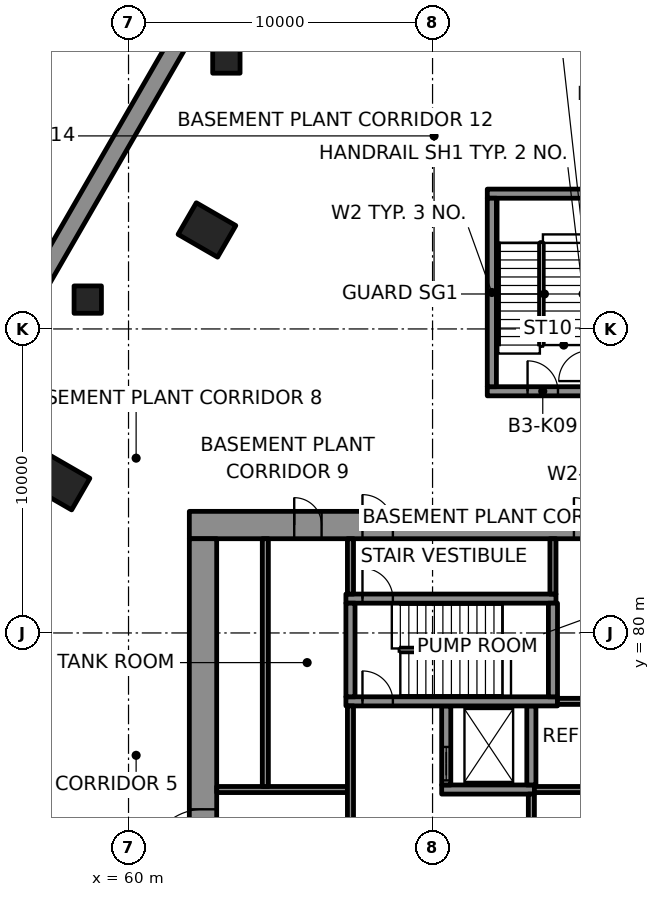
"""IFC4 building model, lengths in metres.
Left out: names, types, materials, properties, quantities, classifications, styles, units other than length and angle.
Written with IfcOpenShell. Run it as: python <this file> out.ifc"""

import sys

from ifc_helpers import new_model, si_unit, direction, frame, frame_2d, origin, origin_2d, place, context, subcontext, project, spatial, polyline, rectangle, outline, extrude, element, fill, save


model = new_model("IFC4")
c1 = context("Model", 3, precision=1e-05, world=origin(), true_north=direction((0.0, 1.0)))
c2 = subcontext(c1, "Body", "Model", "MODEL_VIEW")
j1 = project(units=[si_unit("LENGTHUNIT", "METRE"), si_unit("PLANEANGLEUNIT", "RADIAN")], contexts=[c1])
p1 = place(None, origin())
s1 = spatial("IfcSite", under=j1, at=p1, CompositionType="ELEMENT")
p2 = place(p1, origin())
s2 = spatial("IfcBuilding", under=s1, at=p2, CompositionType="ELEMENT")
p3 = place(p2, frame((0.0, 0.0, -14.0)))
s3 = spatial("IfcBuildingStorey", under=s2, at=p3, CompositionType="ELEMENT", Elevation=-14.0)
p4 = place(p3, frame((67.936, 110.334, -0.35), z_axis=(0.0, 0.0, 1.0), x_axis=(-0.499999089162, -0.866025929656, 0.0)))
e1 = element("IfcWall", 1, at=p4, inside=s3, PredefinedType="SOLIDWALL", context=c2, shape_type="SweptSolid", body=[
    extrude(rectangle(XDim=53.501, YDim=0.6, at=frame_2d((26.751, 0.0))), origin(), (0.0, 0.0, 1.0), 4.5),
])
p5 = place(p3, frame((0.0, 0.0, -14.5)))
e2 = element("IfcWall", 2, at=p5, inside=s3, PredefinedType="SOLIDWALL", context=c2, shape_type="SweptSolid", body=[
    extrude(outline(polyline([(67.936, 110.334), (41.185, 64.0), (40.723, 64.8), (67.474, 111.134), (67.936, 110.334)])), origin(), (0.0, 0.0, 1.0), 14.15),
])
for number, where, z_axis, x_axis in (
    (3, (62.579, 93.256, -0.35), (0.0, 0.0, 1.0), (-0.5, -0.866, 0.0)),
    (4, (57.78, 84.942, -0.35), (0.0, 0.0, 1.0), (-0.5, -0.866, 0.0)),
):
    element("IfcColumn", number, at=place(p3, frame(where, z_axis=z_axis, x_axis=x_axis)), inside=s3, PredefinedType="COLUMN", context=c2, shape_type="SweptSolid", body=[
        extrude(rectangle(XDim=1.2, YDim=1.5, at=origin_2d()), origin(), (0.0, 0.0, 1.0), 4.85),
    ])
for number, where, z_axis, x_axis in (
    (5, (58.659, 90.966, -0.35), (0.0, 0.0, 1.0), (1.0, 0.0, 0.0)),
    (6, (63.219, 98.863, -0.35), (0.0, 0.0, 1.0), (1.0, 0.0, 0.0)),
):
    element("IfcColumn", number, at=place(p3, frame(where, z_axis=z_axis, x_axis=x_axis)), inside=s3, PredefinedType="COLUMN", context=c2, shape_type="SweptSolid", body=[
        extrude(rectangle(XDim=0.9, YDim=0.9, at=origin_2d()), origin(), (0.0, 0.0, 1.0), 4.85),
    ])
p6 = place(p3, frame((62.0, 83.55, -0.35), z_axis=(0.0, 0.0, 1.0), x_axis=(1.0, 0.0, 0.0)))
e7 = element("IfcWall", 7, at=p6, inside=s3, PredefinedType="SHEAR", context=c2, shape_type="SweptSolid", body=[
    extrude(rectangle(XDim=26.0, YDim=0.9, at=frame_2d((13.0, 0.0))), origin(), (0.0, 0.0, 1.0), 4.5),
])
p7 = place(p6, frame((5.695, 0.0, 0.35)))
e8 = element("IfcOpeningElement", 8, at=p7, cuts=e7, PredefinedType="OPENING", context=c2, shape_type="SweptSolid", body=[
    extrude(rectangle(XDim=1.0, YDim=2.1, at=frame_2d((0.5, 1.05))), frame((0.0, 0.46, 0.0), z_axis=(0.0, -1.0, 0.0), x_axis=(1.0, 0.0, 0.0)), (0.0, 0.0, 1.0), 0.92),
])
p8 = place(p6, frame((19.505, 0.0, 0.35)))
e9 = element("IfcOpeningElement", 9, at=p8, cuts=e7, PredefinedType="OPENING", context=c2, shape_type="SweptSolid", body=[
    extrude(rectangle(XDim=1.0, YDim=2.1, at=frame_2d((0.5, 1.05))), frame((0.0, 0.46, 0.0), z_axis=(0.0, -1.0, 0.0), x_axis=(1.0, 0.0, 0.0)), (0.0, 0.0, 1.0), 0.92),
])
p9 = place(p6, frame((3.45, 0.0, 0.35)))
e10 = element("IfcOpeningElement", 10, at=p9, cuts=e7, PredefinedType="OPENING", context=c2, shape_type="SweptSolid", body=[
    extrude(rectangle(XDim=0.9, YDim=2.1, at=frame_2d((0.45, 1.05))), frame((0.0, 0.46, 0.0), z_axis=(0.0, -1.0, 0.0), x_axis=(1.0, 0.0, 0.0)), (0.0, 0.0, 1.0), 0.92),
])
p10 = place(p6, frame((12.65, 0.0, 0.35)))
e11 = element("IfcOpeningElement", 11, at=p10, cuts=e7, PredefinedType="OPENING", context=c2, shape_type="SweptSolid", body=[
    extrude(rectangle(XDim=0.9, YDim=2.1, at=frame_2d((0.45, 1.05))), frame((0.0, 0.46, 0.0), z_axis=(0.0, -1.0, 0.0), x_axis=(1.0, 0.0, 0.0)), (0.0, 0.0, 1.0), 0.92),
])
p11 = place(p6, frame((22.55, 0.0, 0.35)))
e12 = element("IfcOpeningElement", 12, at=p11, cuts=e7, PredefinedType="OPENING", context=c2, shape_type="SweptSolid", body=[
    extrude(rectangle(XDim=0.9, YDim=2.1, at=frame_2d((0.45, 1.05))), frame((0.0, 0.46, 0.0), z_axis=(0.0, -1.0, 0.0), x_axis=(1.0, 0.0, 0.0)), (0.0, 0.0, 1.0), 0.92),
])
p12 = place(p3, frame((62.45, 66.9, -0.35), z_axis=(0.0, 0.0, 1.0), x_axis=(0.0, 1.0, 0.0)))
e13 = element("IfcWall", 13, at=p12, inside=s3, PredefinedType="SHEAR", context=c2, shape_type="SweptSolid", body=[
    extrude(rectangle(XDim=16.2, YDim=0.9, at=frame_2d((8.1, 0.0))), origin(), (0.0, 0.0, 1.0), 4.5),
])
p13 = place(p12, frame((5.5, 0.0, 0.35)))
e14 = element("IfcOpeningElement", 14, at=p13, cuts=e13, PredefinedType="OPENING", context=c2, shape_type="SweptSolid", body=[
    extrude(rectangle(XDim=1.8, YDim=2.1, at=frame_2d((0.9, 1.05))), frame((0.0, 0.46, 0.0), z_axis=(0.0, -1.0, 0.0), x_axis=(1.0, 0.0, 0.0)), (0.0, 0.0, 1.0), 0.92),
])
p14 = place(p3, frame((70.3, 74.85, -0.35), z_axis=(0.0, 0.0, 1.0), x_axis=(1.0, 0.0, 0.0)))
e15 = element("IfcWall", 15, at=p14, inside=s3, PredefinedType="SHEAR", context=c2, shape_type="SweptSolid", body=[
    extrude(rectangle(XDim=3.05, YDim=0.3, at=frame_2d((1.525, 0.0))), origin(), (0.0, 0.0, 1.0), 4.5),
])
p15 = place(p3, frame((70.45, 75.0, -0.35), z_axis=(0.0, 0.0, 1.0), x_axis=(0.0, 1.0, 0.0)))
e16 = element("IfcWall", 16, at=p15, inside=s3, PredefinedType="SHEAR", context=c2, shape_type="SweptSolid", body=[
    extrude(rectangle(XDim=2.6, YDim=0.3, at=frame_2d((1.3, 0.0))), origin(), (0.0, 0.0, 1.0), 4.5),
])
p16 = place(p15, frame((0.15, 0.0, 0.35)))
e17 = element("IfcOpeningElement", 17, at=p16, cuts=e16, PredefinedType="OPENING", context=c2, shape_type="SweptSolid", body=[
    extrude(rectangle(XDim=1.1, YDim=2.1, at=frame_2d((0.55, 1.05))), frame((0.0, 0.16, 0.0), z_axis=(0.0, -1.0, 0.0), x_axis=(1.0, 0.0, 0.0)), (0.0, 0.0, 1.0), 0.32),
])
p17 = place(p3, frame((73.25, 75.0, -0.35), z_axis=(0.0, 0.0, 1.0), x_axis=(0.0, 1.0, 0.0)))
e18 = element("IfcWall", 18, at=p17, inside=s3, PredefinedType="SHEAR", context=c2, shape_type="SweptSolid", body=[
    extrude(rectangle(XDim=2.6, YDim=0.3, at=frame_2d((1.3, 0.0))), origin(), (0.0, 0.0, 1.0), 4.5),
])
p18 = place(p3, frame((67.15, 77.75, -0.35), z_axis=(0.0, 0.0, 1.0), x_axis=(1.0, 0.0, 0.0)))
e19 = element("IfcWall", 19, at=p18, inside=s3, PredefinedType="SHEAR", context=c2, shape_type="SweptSolid", body=[
    extrude(rectangle(XDim=6.96, YDim=0.3, at=frame_2d((3.48, 0.0))), origin(), (0.0, 0.0, 1.0), 4.5),
])
p19 = place(p18, frame((0.545, 0.0, 0.35)))
e20 = element("IfcOpeningElement", 20, at=p19, cuts=e19, PredefinedType="OPENING", context=c2, shape_type="SweptSolid", body=[
    extrude(rectangle(XDim=1.0, YDim=2.1, at=frame_2d((0.5, 1.05))), frame((0.0, 0.16, 0.0), z_axis=(0.0, -1.0, 0.0), x_axis=(1.0, 0.0, 0.0)), (0.0, 0.0, 1.0), 0.32),
])
p20 = place(p3, frame((67.15, 81.13, -0.35), z_axis=(0.0, 0.0, 1.0), x_axis=(1.0, 0.0, 0.0)))
e21 = element("IfcWall", 21, at=p20, inside=s3, PredefinedType="SHEAR", context=c2, shape_type="SweptSolid", body=[
    extrude(rectangle(XDim=6.91, YDim=0.3, at=frame_2d((3.455, 0.0))), origin(), (0.0, 0.0, 1.0), 4.5),
])
p21 = place(p20, frame((0.545, 0.0, 0.35)))
e22 = element("IfcOpeningElement", 22, at=p21, cuts=e21, PredefinedType="OPENING", context=c2, shape_type="SweptSolid", body=[
    extrude(rectangle(XDim=1.0, YDim=2.1, at=frame_2d((0.5, 1.05))), frame((0.0, 0.16, 0.0), z_axis=(0.0, -1.0, 0.0), x_axis=(1.0, 0.0, 0.0)), (0.0, 0.0, 1.0), 0.32),
])
for number, where, z_axis, x_axis in (
    (23, (67.3, 77.9, -0.35), (0.0, 0.0, 1.0), (0.0, 1.0, 0.0)),
    (24, (73.96, 77.9, -0.35), (0.0, 0.0, 1.0), (0.0, 1.0, 0.0)),
):
    element("IfcWall", number, at=place(p3, frame(where, z_axis=z_axis, x_axis=x_axis)), inside=s3, PredefinedType="SHEAR", context=c2, shape_type="SweptSolid", body=[
        extrude(rectangle(XDim=3.08, YDim=0.3, at=frame_2d((1.54, 0.0))), origin(), (0.0, 0.0, 1.0), 4.5),
    ])
p22 = place(p3, frame((71.8, 87.95, -0.35), z_axis=(0.0, 0.0, 1.0), x_axis=(1.0, 0.0, 0.0)))
e25 = element("IfcWall", 25, at=p22, inside=s3, PredefinedType="SHEAR", context=c2, shape_type="SweptSolid", body=[
    extrude(rectangle(XDim=6.4, YDim=0.3, at=frame_2d((3.2, 0.0))), origin(), (0.0, 0.0, 1.0), 4.5),
])
p23 = place(p22, frame((1.325, 0.0, 0.35)))
e26 = element("IfcOpeningElement", 26, at=p23, cuts=e25, PredefinedType="OPENING", context=c2, shape_type="SweptSolid", body=[
    extrude(rectangle(XDim=1.0, YDim=2.1, at=frame_2d((0.5, 1.05))), frame((0.0, 0.16, 0.0), z_axis=(0.0, -1.0, 0.0), x_axis=(1.0, 0.0, 0.0)), (0.0, 0.0, 1.0), 0.32),
])
p24 = place(p22, frame((4.125, 0.0, 0.35)))
e27 = element("IfcOpeningElement", 27, at=p24, cuts=e25, PredefinedType="OPENING", context=c2, shape_type="SweptSolid", body=[
    extrude(rectangle(XDim=1.2, YDim=2.1, at=frame_2d((0.6, 1.05))), frame((0.0, 0.16, 0.0), z_axis=(0.0, -1.0, 0.0), x_axis=(1.0, 0.0, 0.0)), (0.0, 0.0, 1.0), 0.32),
])
p25 = place(p3, frame((71.8, 94.45, -0.35), z_axis=(0.0, 0.0, 1.0), x_axis=(1.0, 0.0, 0.0)))
e28 = element("IfcWall", 28, at=p25, inside=s3, PredefinedType="SHEAR", context=c2, shape_type="SweptSolid", body=[
    extrude(rectangle(XDim=6.4, YDim=0.3, at=frame_2d((3.2, 0.0))), origin(), (0.0, 0.0, 1.0), 4.5),
])
p26 = place(p3, frame((71.95, 88.1, -0.35), z_axis=(0.0, 0.0, 1.0), x_axis=(0.0, 1.0, 0.0)))
e29 = element("IfcWall", 29, at=p26, inside=s3, PredefinedType="SHEAR", context=c2, shape_type="SweptSolid", body=[
    extrude(rectangle(XDim=6.2, YDim=0.3, at=frame_2d((3.1, 0.0))), origin(), (0.0, 0.0, 1.0), 4.5),
])
p27 = place(p3, frame((62.9, 74.85, 0.0), z_axis=(0.0, 0.0, 1.0), x_axis=(1.0, 0.0, 0.0)))
e30 = element("IfcWall", 30, at=p27, inside=s3, PredefinedType="PARTITIONING", context=c2, shape_type="SweptSolid", body=[
    extrude(rectangle(XDim=4.3, YDim=0.2, at=frame_2d((2.15, 0.0))), origin(), (0.0, 0.0, 1.0), 4.15),
])
p28 = place(p3, frame((73.35, 74.85, 0.0), z_axis=(0.0, 0.0, 1.0), x_axis=(1.0, 0.0, 0.0)))
e31 = element("IfcWall", 31, at=p28, inside=s3, PredefinedType="PARTITIONING", context=c2, shape_type="SweptSolid", body=[
    extrude(rectangle(XDim=13.75, YDim=0.2, at=frame_2d((6.875, 0.0))), origin(), (0.0, 0.0, 1.0), 4.15),
])
p29 = place(p28, frame((2.25, 0.0, 0.0)))
e32 = element("IfcOpeningElement", 32, at=p29, cuts=e31, PredefinedType="OPENING", context=c2, shape_type="SweptSolid", body=[
    extrude(rectangle(XDim=0.9, YDim=2.1, at=frame_2d((0.45, 1.05))), frame((0.0, 0.11, 0.0), z_axis=(0.0, -1.0, 0.0), x_axis=(1.0, 0.0, 0.0)), (0.0, 0.0, 1.0), 0.22),
])
p30 = place(p28, frame((7.85, 0.0, 0.0)))
e33 = element("IfcOpeningElement", 33, at=p30, cuts=e31, PredefinedType="OPENING", context=c2, shape_type="SweptSolid", body=[
    extrude(rectangle(XDim=0.9, YDim=2.1, at=frame_2d((0.45, 1.05))), frame((0.0, 0.11, 0.0), z_axis=(0.0, -1.0, 0.0), x_axis=(1.0, 0.0, 0.0)), (0.0, 0.0, 1.0), 0.22),
])
p31 = place(p3, frame((74.11, 77.75, 0.0), z_axis=(0.0, 0.0, 1.0), x_axis=(1.0, 0.0, 0.0)))
e34 = element("IfcWall", 34, at=p31, inside=s3, PredefinedType="PARTITIONING", context=c2, shape_type="SweptSolid", body=[
    extrude(rectangle(XDim=1.98, YDim=0.2, at=frame_2d((0.99, 0.0))), origin(), (0.0, 0.0, 1.0), 4.15),
])
p32 = place(p3, frame((64.5, 74.95, 0.0), z_axis=(0.0, 0.0, 1.0), x_axis=(0.0, 1.0, 0.0)))
e35 = element("IfcWall", 35, at=p32, inside=s3, PredefinedType="PARTITIONING", context=c2, shape_type="SweptSolid", body=[
    extrude(rectangle(XDim=8.15, YDim=0.2, at=frame_2d((4.075, 0.0))), origin(), (0.0, 0.0, 1.0), 4.15),
])
p33 = place(p3, frame((67.3, 71.85, 0.0), z_axis=(0.0, 0.0, 1.0), x_axis=(0.0, 1.0, 0.0)))
e36 = element("IfcWall", 36, at=p33, inside=s3, PredefinedType="PARTITIONING", context=c2, shape_type="SweptSolid", body=[
    extrude(rectangle(XDim=5.75, YDim=0.2, at=frame_2d((2.875, 0.0))), origin(), (0.0, 0.0, 1.0), 4.15),
])
p34 = place(p33, frame((0.85, 0.0, 0.0)))
e37 = element("IfcOpeningElement", 37, at=p34, cuts=e36, PredefinedType="OPENING", context=c2, shape_type="SweptSolid", body=[
    extrude(rectangle(XDim=1.2, YDim=2.1, at=frame_2d((0.6, 1.05))), frame((0.0, 0.11, 0.0), z_axis=(0.0, -1.0, 0.0), x_axis=(1.0, 0.0, 0.0)), (0.0, 0.0, 1.0), 0.22),
])
p35 = place(p3, frame((67.3, 81.28, 0.0), z_axis=(0.0, 0.0, 1.0), x_axis=(0.0, 1.0, 0.0)))
e38 = element("IfcWall", 38, at=p35, inside=s3, PredefinedType="PARTITIONING", context=c2, shape_type="SweptSolid", body=[
    extrude(rectangle(XDim=1.82, YDim=0.2, at=frame_2d((0.91, 0.0))), origin(), (0.0, 0.0, 1.0), 4.15),
])
p36 = place(p3, frame((73.25, 71.9, 0.0), z_axis=(0.0, 0.0, 1.0), x_axis=(0.0, 1.0, 0.0)))
e39 = element("IfcWall", 39, at=p36, inside=s3, PredefinedType="PARTITIONING", context=c2, shape_type="SweptSolid", body=[
    extrude(rectangle(XDim=2.8, YDim=0.2, at=frame_2d((1.4, 0.0))), origin(), (0.0, 0.0, 1.0), 4.15),
])
p37 = place(p36, frame((0.8, 0.0, 0.0)))
e40 = element("IfcOpeningElement", 40, at=p37, cuts=e39, PredefinedType="OPENING", context=c2, shape_type="SweptSolid", body=[
    extrude(rectangle(XDim=1.2, YDim=2.1, at=frame_2d((0.6, 1.05))), frame((0.0, 0.11, 0.0), z_axis=(0.0, -1.0, 0.0), x_axis=(1.0, 0.0, 0.0)), (0.0, 0.0, 1.0), 0.22),
])
p38 = place(p3, frame((73.96, 81.28, 0.0), z_axis=(0.0, 0.0, 1.0), x_axis=(0.0, 1.0, 0.0)))
e41 = element("IfcWall", 41, at=p38, inside=s3, PredefinedType="PARTITIONING", context=c2, shape_type="SweptSolid", body=[
    extrude(rectangle(XDim=1.82, YDim=0.2, at=frame_2d((0.91, 0.0))), origin(), (0.0, 0.0, 1.0), 4.15),
])
p39 = place(p16, origin())
e42 = element("IfcDoor", 42, at=p39, inside=s3, OperationType="DOUBLE_DOOR_SLIDING", PredefinedType="DOOR", context=c2, shape_type="SweptSolid", body=[
    extrude(rectangle(XDim=1.1, YDim=2.1, at=frame_2d((0.55, 1.05))), frame((0.0, 0.025, 0.0), z_axis=(0.0, -1.0, 0.0), x_axis=(1.0, 0.0, 0.0)), (0.0, 0.0, 1.0), 0.05),
])
fill(e17, e42)
p40 = place(p19, origin())
e43 = element("IfcDoor", 43, at=p40, inside=s3, OperationType="SINGLE_SWING_LEFT", PredefinedType="DOOR", context=c2, shape_type="SweptSolid", body=[
    extrude(rectangle(XDim=1.0, YDim=2.1, at=frame_2d((0.5, 1.05))), frame((0.0, 0.025, 0.0), z_axis=(0.0, -1.0, 0.0), x_axis=(1.0, 0.0, 0.0)), (0.0, 0.0, 1.0), 0.05),
])
fill(e20, e43)
p41 = place(p21, origin())
e44 = element("IfcDoor", 44, at=p41, inside=s3, OperationType="SINGLE_SWING_RIGHT", PredefinedType="DOOR", context=c2, shape_type="SweptSolid", body=[
    extrude(rectangle(XDim=1.0, YDim=2.1, at=frame_2d((0.5, 1.05))), frame((0.0, 0.025, 0.0), z_axis=(0.0, -1.0, 0.0), x_axis=(1.0, 0.0, 0.0)), (0.0, 0.0, 1.0), 0.05),
])
fill(e22, e44)
p42 = place(p7, origin())
e45 = element("IfcDoor", 45, at=p42, inside=s3, OperationType="SINGLE_SWING_LEFT", PredefinedType="DOOR", context=c2, shape_type="SweptSolid", body=[
    extrude(rectangle(XDim=1.0, YDim=2.1, at=frame_2d((0.5, 1.05))), frame((0.0, 0.17, 0.0), z_axis=(0.0, -1.0, 0.0), x_axis=(1.0, 0.0, 0.0)), (0.0, 0.0, 1.0), 0.34),
])
fill(e8, e45)
p43 = place(p23, origin())
e46 = element("IfcDoor", 46, at=p43, inside=s3, OperationType="SINGLE_SWING_RIGHT", PredefinedType="DOOR", context=c2, shape_type="SweptSolid", body=[
    extrude(rectangle(XDim=1.0, YDim=2.1, at=frame_2d((0.5, 1.05))), frame((0.0, 0.025, 0.0), z_axis=(0.0, -1.0, 0.0), x_axis=(1.0, 0.0, 0.0)), (0.0, 0.0, 1.0), 0.05),
])
fill(e26, e46)
p44 = place(p13, origin())
e47 = element("IfcDoor", 47, at=p44, inside=s3, OperationType="SINGLE_SWING_LEFT", PredefinedType="DOOR", context=c2, shape_type="SweptSolid", body=[
    extrude(rectangle(XDim=1.8, YDim=2.1, at=frame_2d((0.9, 1.05))), frame((0.0, 0.17, 0.0), z_axis=(0.0, -1.0, 0.0), x_axis=(1.0, 0.0, 0.0)), (0.0, 0.0, 1.0), 0.34),
])
fill(e14, e47)
p45 = place(p9, origin())
e48 = element("IfcDoor", 48, at=p45, inside=s3, OperationType="SINGLE_SWING_LEFT", PredefinedType="DOOR", context=c2, shape_type="SweptSolid", body=[
    extrude(rectangle(XDim=0.9, YDim=2.1, at=frame_2d((0.45, 1.05))), frame((0.0, 0.17, 0.0), z_axis=(0.0, -1.0, 0.0), x_axis=(1.0, 0.0, 0.0)), (0.0, 0.0, 1.0), 0.34),
])
fill(e10, e48)
p46 = place(p10, origin())
e49 = element("IfcDoor", 49, at=p46, inside=s3, OperationType="SINGLE_SWING_LEFT", PredefinedType="DOOR", context=c2, shape_type="SweptSolid", body=[
    extrude(rectangle(XDim=0.9, YDim=2.1, at=frame_2d((0.45, 1.05))), frame((0.0, 0.17, 0.0), z_axis=(0.0, -1.0, 0.0), x_axis=(1.0, 0.0, 0.0)), (0.0, 0.0, 1.0), 0.34),
])
fill(e11, e49)
save(model, sys.argv[1])
